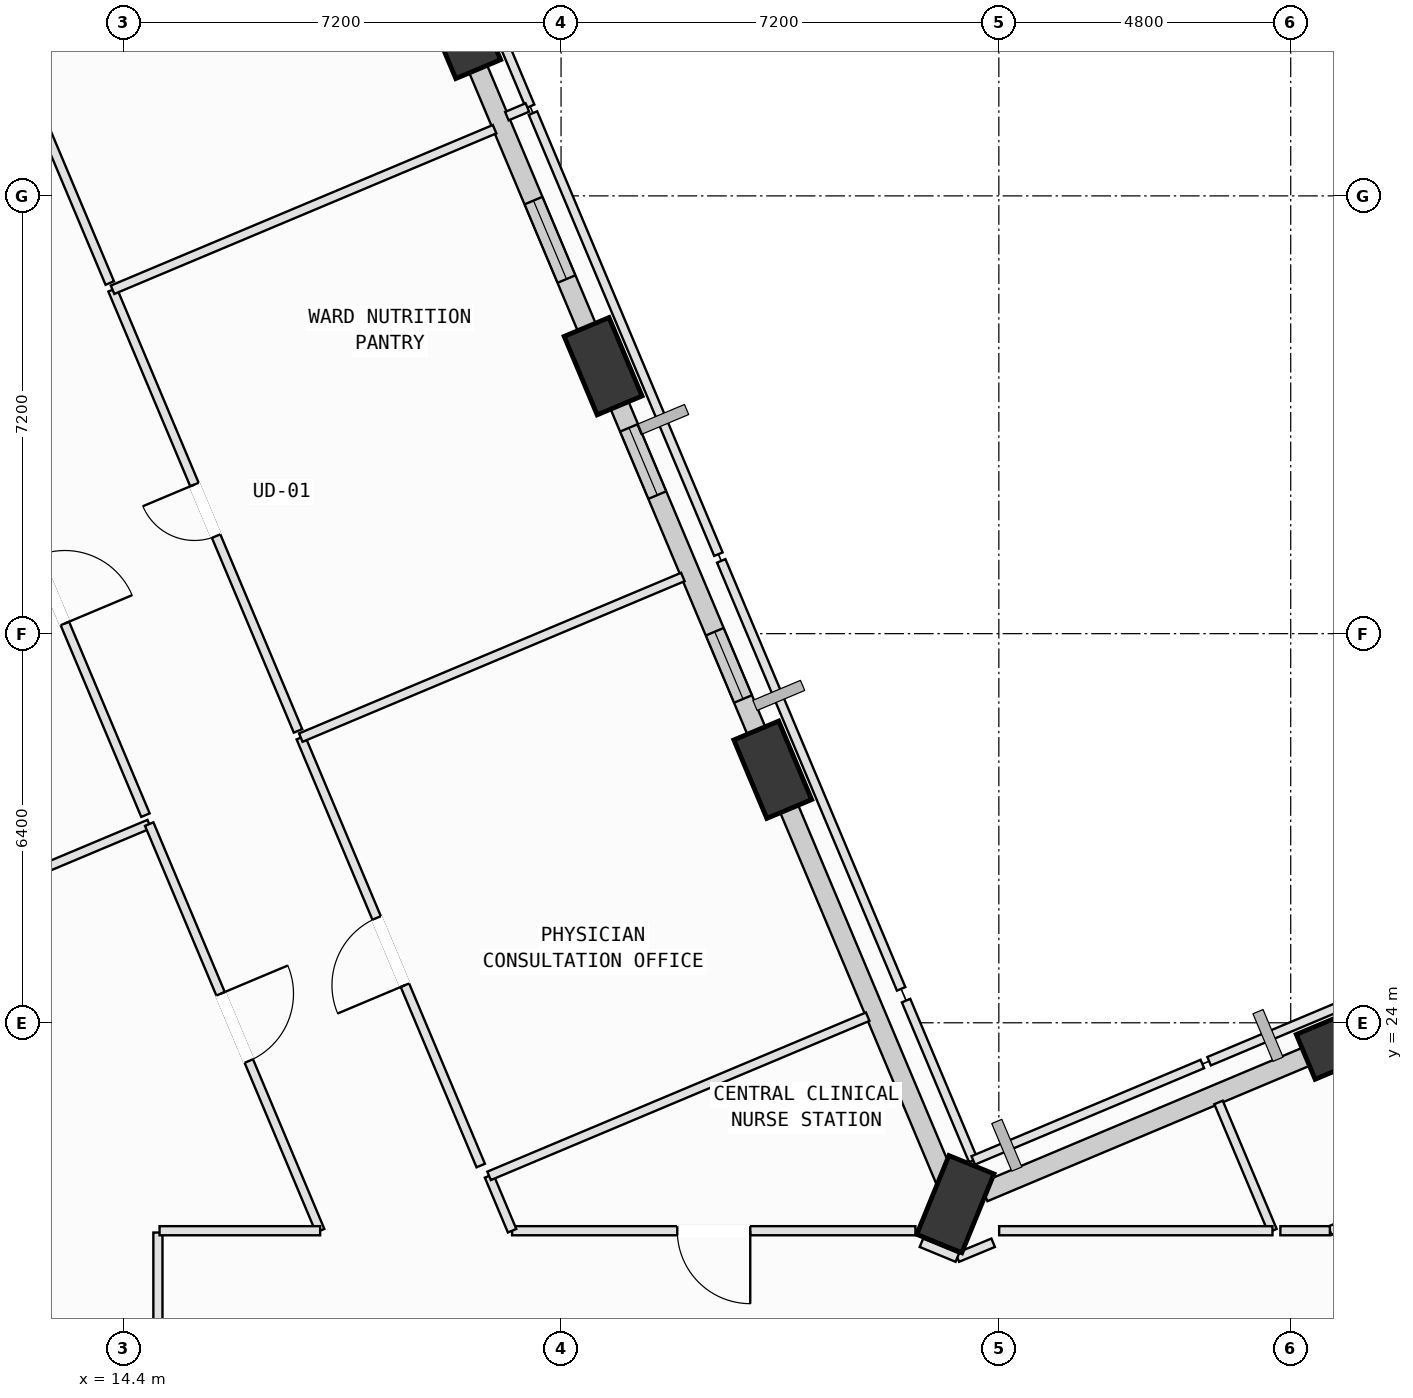
"""IFC4 building model, lengths in metres.
Left out: names, types, materials, properties, quantities, classifications, styles, units other than length and angle.
Written with IfcOpenShell. Run it as: python <this file> out.ifc"""

import sys

from ifc_helpers import new_model, si_unit, direction, frame, frame_2d, origin, origin_2d, place, context, subcontext, project, spatial, rectangle, extrude, element, fill, save


model = new_model("IFC4")
c1 = context("Model", 3, precision=1e-05, world=origin(), true_north=direction((0.0, 1.0)))
c2 = subcontext(c1, "Body", "Model", "MODEL_VIEW")
j1 = project(units=[si_unit("LENGTHUNIT", "METRE"), si_unit("PLANEANGLEUNIT", "RADIAN")], contexts=[c1])
p1 = place(None, origin())
s1 = spatial("IfcSite", under=j1, at=p1, CompositionType="ELEMENT")
p2 = place(p1, origin())
s2 = spatial("IfcBuilding", under=s1, at=p2, CompositionType="ELEMENT")
p3 = place(p2, frame((0.0, 0.0, 120.4)))
s3 = spatial("IfcBuildingStorey", under=s2, at=p3, CompositionType="ELEMENT", Elevation=120.4)
p4 = place(p3, frame((34.492, 23.71, 0.002), z_axis=(0.004459574025, 0.003726493364, 0.999983112581), x_axis=(-0.888473565958, 0.458922270897, 0.002252080872)))
e1 = element("IfcColumn", 1, at=p4, inside=s3, PredefinedType="COLUMN", context=c2, shape_type="SweptSolid", body=[
    extrude(rectangle(XDim=1.4, YDim=0.8, at=origin_2d()), origin(), (0.0, 0.0, 1.0), 3.996),
])
p5 = place(p3, frame((28.085, 21.017, 0.002), z_axis=(0.015877558685, -0.022778189959, 0.999614454273), x_axis=(-0.219275335799, 0.975324277827, 0.025707590136)))
e2 = element("IfcColumn", 2, at=p5, inside=s3, PredefinedType="COLUMN", context=c2, shape_type="SweptSolid", body=[
    extrude(rectangle(XDim=1.4, YDim=0.8, at=origin_2d()), origin(), (0.0, 0.0, 1.0), 3.998),
])
p6 = place(p3, frame((25.082, 28.162, 0.002), z_axis=(-0.013674542539, -0.035407297646, 0.999279405452), x_axis=(-0.029610655568, 0.998948888693, 0.034990382344)))
e3 = element("IfcColumn", 3, at=p6, inside=s3, PredefinedType="COLUMN", context=c2, shape_type="SweptSolid", body=[
    extrude(rectangle(XDim=1.4, YDim=0.8, at=origin_2d()), origin(), (0.0, 0.0, 1.0), 3.999),
])
p7 = place(p3, frame((22.292, 34.799, 0.002), z_axis=(-0.040973075372, -0.047131231045, 0.998048021968), x_axis=(0.311183272161, 0.948604503294, 0.057571411811)))
e4 = element("IfcColumn", 4, at=p7, inside=s3, PredefinedType="COLUMN", context=c2, shape_type="SweptSolid", body=[
    extrude(rectangle(XDim=1.4, YDim=0.8, at=origin_2d()), origin(), (0.0, 0.0, 1.0), 4.004),
])
p8 = place(p3, frame((19.966, 40.33, 0.002), z_axis=(-0.063668290579, -0.056790167409, 0.996353966048), x_axis=(0.427498847838, 0.900588142351, 0.078649430732)))
e5 = element("IfcColumn", 5, at=p8, inside=s3, PredefinedType="COLUMN", context=c2, shape_type="SweptSolid", body=[
    extrude(rectangle(XDim=1.4, YDim=0.8, at=origin_2d()), origin(), (0.0, 0.0, 1.0), 4.011),
])
p9 = place(p3, frame((28.55, 21.213, 0.0), z_axis=(0.0, 0.0, 1.0), x_axis=(0.921866530415, 0.387507548444, 0.0)))
e6 = element("IfcWall", 6, at=p9, inside=s3, PredefinedType="SOLIDWALL", context=c2, shape_type="SweptSolid", body=[
    extrude(rectangle(XDim=5.96, YDim=0.32, at=frame_2d((2.98, 0.0))), origin(), (0.0, 0.0, 1.0), 3.165),
])
p10 = place(p3, frame((25.294, 27.656, 0.0), z_axis=(0.0, 0.0, 1.0), x_axis=(0.387511216986, -0.921864988331, 0.0)))
e7 = element("IfcWall", 7, at=p10, inside=s3, PredefinedType="SOLIDWALL", context=c2, shape_type="SweptSolid", body=[
    extrude(rectangle(XDim=6.76, YDim=0.32, at=frame_2d((3.38, 0.0))), origin(), (0.0, 0.0, 1.0), 3.165),
])
p11 = place(p3, frame((22.5, 34.302, 0.0), z_axis=(0.0, 0.0, 1.0), x_axis=(0.387521956869, -0.921860473686, 0.0)))
e8 = element("IfcWall", 8, at=p11, inside=s3, PredefinedType="SOLIDWALL", context=c2, shape_type="SweptSolid", body=[
    extrude(rectangle(XDim=6.223, YDim=0.32, at=frame_2d((3.111, 0.0))), origin(), (0.0, 0.0, 1.0), 3.165),
])
p12 = place(p11, frame((4.199, 0.0, 0.75)))
e9 = element("IfcOpeningElement", 9, at=p12, cuts=e8, PredefinedType="OPENING", context=c2, shape_type="SweptSolid", body=[
    extrude(rectangle(XDim=1.2, YDim=1.75, at=frame_2d((0.6, 0.875))), frame((0.0, 0.17, 0.0), z_axis=(0.0, -1.0, 0.0), x_axis=(1.0, 0.0, 0.0)), (0.0, 0.0, 1.0), 0.34),
])
p13 = place(p11, frame((0.561, 0.0, 0.75)))
e10 = element("IfcOpeningElement", 10, at=p13, cuts=e8, PredefinedType="OPENING", context=c2, shape_type="SweptSolid", body=[
    extrude(rectangle(XDim=1.2, YDim=1.75, at=frame_2d((0.6, 0.875))), frame((0.0, 0.17, 0.0), z_axis=(0.0, -1.0, 0.0), x_axis=(1.0, 0.0, 0.0)), (0.0, 0.0, 1.0), 0.34),
])
p14 = place(p3, frame((20.17, 39.847, 0.0), z_axis=(0.0, 0.0, 1.0), x_axis=(0.387505493495, -0.921867394212, 0.0)))
e11 = element("IfcWall", 11, at=p14, inside=s3, PredefinedType="SOLIDWALL", context=c2, shape_type="SweptSolid", body=[
    extrude(rectangle(XDim=5.047, YDim=0.32, at=frame_2d((2.523, 0.0))), origin(), (0.0, 0.0, 1.0), 3.165),
])
p15 = place(p14, frame((2.521, 0.0, 0.75)))
e12 = element("IfcOpeningElement", 12, at=p15, cuts=e11, PredefinedType="OPENING", context=c2, shape_type="SweptSolid", body=[
    extrude(rectangle(XDim=1.4, YDim=1.85, at=frame_2d((0.7, 0.925))), frame((0.0, 0.17, 0.0), z_axis=(0.0, -1.0, 0.0), x_axis=(1.0, 0.0, 0.0)), (0.0, 0.0, 1.0), 0.34),
])
p16 = place(p3, frame((14.97, 20.55, 0.0), z_axis=(0.0, 0.0, 1.0), x_axis=(0.0, -1.0, 0.0)))
e13 = element("IfcWall", 13, at=p16, inside=s3, PredefinedType="PARTITIONING", context=c2, shape_type="SweptSolid", body=[
    extrude(rectangle(XDim=1.943, YDim=0.15, at=frame_2d((0.972, 0.0))), origin(), (0.0, 0.0, 1.0), 3.78),
])
p17 = place(p3, frame((4.719, 23.019, 0.0), z_axis=(0.0, 0.0, 1.0), x_axis=(0.921861546859, 0.387519403931, 0.0)))
e14 = element("IfcWall", 14, at=p17, inside=s3, PredefinedType="PARTITIONING", context=c2, shape_type="SweptSolid", body=[
    extrude(rectangle(XDim=10.965, YDim=0.15, at=frame_2d((5.482, 0.0))), origin(), (0.0, 0.0, 1.0), 3.78),
])
p18 = place(p3, frame((14.827, 27.268, 0.0), z_axis=(0.0, 0.0, 1.0), x_axis=(0.387476197679, -0.921879708114, 0.0)))
e15 = element("IfcWall", 15, at=p18, inside=s3, PredefinedType="PARTITIONING", context=c2, shape_type="SweptSolid", body=[
    extrude(rectangle(XDim=7.255, YDim=0.15, at=frame_2d((3.627, 0.0))), origin(), (0.0, 0.0, 1.0), 3.78),
])
p19 = place(p18, frame((3.027, 0.0, 0.0)))
e16 = element("IfcOpeningElement", 16, at=p19, cuts=e15, PredefinedType="OPENING", context=c2, shape_type="SweptSolid", body=[
    extrude(rectangle(XDim=1.2, YDim=2.15, at=frame_2d((0.6, 1.075))), frame((0.0, 0.085, 0.0), z_axis=(0.0, -1.0, 0.0), x_axis=(1.0, 0.0, 0.0)), (0.0, 0.0, 1.0), 0.17),
])
p20 = place(p3, frame((17.638, 20.58, 0.0), z_axis=(0.0, 0.0, 1.0), x_axis=(-1.0, 0.0, 0.0)))
e17 = element("IfcWall", 17, at=p20, inside=s3, PredefinedType="PARTITIONING", context=c2, shape_type="SweptSolid", body=[
    extrude(rectangle(XDim=2.641, YDim=0.15, at=frame_2d((1.32, 0.0))), origin(), (0.0, 0.0, 1.0), 3.78),
])
p21 = place(p3, frame((11.649, 34.827, 0.0), z_axis=(0.0, 0.0, 1.0), x_axis=(0.387547881375, -0.921849575387, 0.0)))
e18 = element("IfcWall", 18, at=p21, inside=s3, PredefinedType="PARTITIONING", context=c2, shape_type="SweptSolid", body=[
    extrude(rectangle(XDim=8.04, YDim=0.15, at=frame_2d((4.02, 0.0))), origin(), (0.0, 0.0, 1.0), 3.78),
])
p22 = place(p21, frame((3.42, 0.0, 0.0)))
e19 = element("IfcOpeningElement", 19, at=p22, cuts=e18, PredefinedType="OPENING", context=c2, shape_type="SweptSolid", body=[
    extrude(rectangle(XDim=1.2, YDim=2.15, at=frame_2d((0.6, 1.075))), frame((0.0, 0.085, 0.0), z_axis=(0.0, -1.0, 0.0), x_axis=(1.0, 0.0, 0.0)), (0.0, 0.0, 1.0), 0.17),
])
p23 = place(p3, frame((28.706, 20.382, 0.0), z_axis=(0.0, 0.0, 1.0), x_axis=(-0.923811477415, -0.382847690599, 0.0)))
e20 = element("IfcWall", 20, at=p23, inside=s3, PredefinedType="PARTITIONING", context=c2, shape_type="SweptSolid", body=[
    extrude(rectangle(XDim=0.638, YDim=0.15, at=frame_2d((0.319, 0.0))), origin(), (0.0, 0.0, 1.0), 3.78),
])
p24 = place(p3, frame((28.117, 20.138, 0.0), z_axis=(0.0, 0.0, 1.0), x_axis=(-0.923979554509, 0.382441868588, 0.0)))
e21 = element("IfcWall", 21, at=p24, inside=s3, PredefinedType="PARTITIONING", context=c2, shape_type="SweptSolid", body=[
    extrude(rectangle(XDim=0.638, YDim=0.15, at=frame_2d((0.319, 0.0))), origin(), (0.0, 0.0, 1.0), 3.78),
])
p25 = place(p3, frame((27.428, 20.58, 0.0), z_axis=(0.0, 0.0, 1.0), x_axis=(-1.0, 0.0, 0.0)))
e22 = element("IfcWall", 22, at=p25, inside=s3, PredefinedType="PARTITIONING", context=c2, shape_type="SweptSolid", body=[
    extrude(rectangle(XDim=6.633, YDim=0.15, at=frame_2d((3.316, 0.0))), origin(), (0.0, 0.0, 1.0), 3.78),
])
p26 = place(p25, frame((2.717, 0.0, 0.0)))
e23 = element("IfcOpeningElement", 23, at=p26, cuts=e22, PredefinedType="OPENING", context=c2, shape_type="SweptSolid", body=[
    extrude(rectangle(XDim=1.2, YDim=2.15, at=frame_2d((0.6, 1.075))), frame((0.0, 0.085, 0.0), z_axis=(0.0, -1.0, 0.0), x_axis=(1.0, 0.0, 0.0)), (0.0, 0.0, 1.0), 0.17),
])
p27 = place(p3, frame((20.795, 20.58, 0.0), z_axis=(0.0, 0.0, 1.0), x_axis=(-0.387342801036, 0.921935764837, 0.0)))
e24 = element("IfcWall", 24, at=p27, inside=s3, PredefinedType="PARTITIONING", context=c2, shape_type="SweptSolid", body=[
    extrude(rectangle(XDim=0.978, YDim=0.15, at=frame_2d((0.489, 0.0))), origin(), (0.0, 0.0, 1.0), 3.78),
])
p28 = place(p3, frame((20.416, 21.482, 0.0), z_axis=(0.0, 0.0, 1.0), x_axis=(0.921833906967, 0.38758514931, 0.0)))
e25 = element("IfcWall", 25, at=p28, inside=s3, PredefinedType="PARTITIONING", context=c2, shape_type="SweptSolid", body=[
    extrude(rectangle(XDim=6.755, YDim=0.15, at=frame_2d((3.377, 0.0))), origin(), (0.0, 0.0, 1.0), 3.78),
])
p29 = place(p3, frame((27.274, 24.365, 0.0), z_axis=(0.0, 0.0, 1.0), x_axis=(0.387605178951, -0.921825485247, 0.0)))
e26 = element("IfcWall", 26, at=p29, inside=s3, PredefinedType="PARTITIONING", context=c2, shape_type="SweptSolid", body=[
    extrude(rectangle(XDim=2.851, YDim=0.15, at=frame_2d((1.425, 0.0))), origin(), (0.0, 0.0, 1.0), 3.78),
])
p30 = place(p3, frame((28.379, 21.737, 0.0), z_axis=(0.0, 0.0, 1.0), x_axis=(0.921774717682, 0.387725895244, 0.0)))
e27 = element("IfcWall", 27, at=p30, inside=s3, PredefinedType="PARTITIONING", context=c2, shape_type="SweptSolid", body=[
    extrude(rectangle(XDim=4.088, YDim=0.15, at=frame_2d((2.044, 0.0))), origin(), (0.0, 0.0, 1.0), 3.78),
])
p31 = place(p3, frame((32.413, 22.69, 0.0), z_axis=(0.0, 0.0, 1.0), x_axis=(0.387537134963, -0.921854093132, 0.0)))
e28 = element("IfcWall", 28, at=p31, inside=s3, PredefinedType="PARTITIONING", context=c2, shape_type="SweptSolid", body=[
    extrude(rectangle(XDim=2.289, YDim=0.15, at=frame_2d((1.145, 0.0))), origin(), (0.0, 0.0, 1.0), 3.78),
])
p32 = place(p3, frame((33.3, 20.58, 0.0), z_axis=(0.0, 0.0, 1.0), x_axis=(-1.0, 0.0, 0.0)))
e29 = element("IfcWall", 29, at=p32, inside=s3, PredefinedType="PARTITIONING", context=c2, shape_type="SweptSolid", body=[
    extrude(rectangle(XDim=4.495, YDim=0.15, at=frame_2d((2.248, 0.0))), origin(), (0.0, 0.0, 1.0), 3.78),
])
p33 = place(p3, frame((32.258, 23.368, 0.0), z_axis=(0.0, 0.0, 1.0), x_axis=(0.921840796655, 0.387568762443, 0.0)))
e30 = element("IfcWall", 30, at=p33, inside=s3, PredefinedType="PARTITIONING", context=c2, shape_type="SweptSolid", body=[
    extrude(rectangle(XDim=6.998, YDim=0.15, at=frame_2d((3.499, 0.0))), origin(), (0.0, 0.0, 1.0), 3.78),
])
p34 = place(p3, frame((44.851, 25.038, 0.0), z_axis=(0.0, 0.0, 1.0), x_axis=(-0.921889203051, -0.38745360664, 0.0)))
e31 = element("IfcWall", 31, at=p34, inside=s3, PredefinedType="PARTITIONING", context=c2, shape_type="SweptSolid", body=[
    extrude(rectangle(XDim=11.506, YDim=0.15, at=frame_2d((5.753, 0.0))), origin(), (0.0, 0.0, 1.0), 2.945),
])
p35 = place(p34, frame((5.153, 0.0, 0.0)))
e32 = element("IfcOpeningElement", 32, at=p35, cuts=e31, PredefinedType="OPENING", context=c2, shape_type="SweptSolid", body=[
    extrude(rectangle(XDim=1.2, YDim=2.15, at=frame_2d((0.6, 1.075))), frame((0.0, 0.085, 0.0), z_axis=(0.0, -1.0, 0.0), x_axis=(1.0, 0.0, 0.0)), (0.0, 0.0, 1.0), 0.17),
])
p36 = place(p3, frame((34.244, 20.58, 0.0), z_axis=(0.0, 0.0, 1.0), x_axis=(-1.0, 0.0, 0.0)))
e33 = element("IfcWall", 33, at=p36, inside=s3, PredefinedType="PARTITIONING", context=c2, shape_type="SweptSolid", body=[
    extrude(rectangle(XDim=0.814, YDim=0.15, at=frame_2d((0.407, 0.0))), origin(), (0.0, 0.0, 1.0), 3.78),
])
p37 = place(p3, frame((20.279, 21.652, 0.0), z_axis=(0.0, 0.0, 1.0), x_axis=(-0.38757659616, 0.921837503093, 0.0)))
e34 = element("IfcWall", 34, at=p37, inside=s3, PredefinedType="PARTITIONING", context=c2, shape_type="SweptSolid", body=[
    extrude(rectangle(XDim=7.635, YDim=0.15, at=frame_2d((3.817, 0.0))), origin(), (0.0, 0.0, 1.0), 3.78),
])
p38 = place(p37, frame((3.217, 0.0, 0.0)))
e35 = element("IfcOpeningElement", 35, at=p38, cuts=e34, PredefinedType="OPENING", context=c2, shape_type="SweptSolid", body=[
    extrude(rectangle(XDim=1.2, YDim=2.15, at=frame_2d((0.6, 1.075))), frame((0.0, 0.085, 0.0), z_axis=(0.0, -1.0, 0.0), x_axis=(1.0, 0.0, 0.0)), (0.0, 0.0, 1.0), 0.17),
])
p39 = place(p3, frame((17.32, 28.69, 0.0), z_axis=(0.0, 0.0, 1.0), x_axis=(0.921811932434, 0.387637409473, 0.0)))
e36 = element("IfcWall", 36, at=p39, inside=s3, PredefinedType="PARTITIONING", context=c2, shape_type="SweptSolid", body=[
    extrude(rectangle(XDim=6.816, YDim=0.15, at=frame_2d((3.408, 0.0))), origin(), (0.0, 0.0, 1.0), 3.78),
])
p40 = place(p3, frame((24.234, 31.597, 0.0), z_axis=(0.0, 0.0, 1.0), x_axis=(0.387558072008, -0.921845291153, 0.0)))
e37 = element("IfcWall", 37, at=p40, inside=s3, PredefinedType="PARTITIONING", context=c2, shape_type="SweptSolid", body=[
    extrude(rectangle(XDim=7.635, YDim=0.15, at=frame_2d((3.818, 0.0))), origin(), (0.0, 0.0, 1.0), 3.78),
])
p41 = place(p3, frame((17.274, 28.801, 0.0), z_axis=(0.0, 0.0, 1.0), x_axis=(-0.387529923364, 0.921857124775, 0.0)))
e38 = element("IfcWall", 38, at=p41, inside=s3, PredefinedType="PARTITIONING", context=c2, shape_type="SweptSolid", body=[
    extrude(rectangle(XDim=7.87, YDim=0.15, at=frame_2d((3.935, 0.0))), origin(), (0.0, 0.0, 1.0), 3.78),
])
p42 = place(p41, frame((3.475, 0.0, 0.0)))
e39 = element("IfcOpeningElement", 39, at=p42, cuts=e38, PredefinedType="OPENING", context=c2, shape_type="SweptSolid", body=[
    extrude(rectangle(XDim=0.92, YDim=2.1, at=frame_2d((0.46, 1.05))), frame((0.0, 0.085, 0.0), z_axis=(0.0, -1.0, 0.0), x_axis=(1.0, 0.0, 0.0)), (0.0, 0.0, 1.0), 0.17),
])
p43 = place(p3, frame((14.224, 36.056, 0.0), z_axis=(0.0, 0.0, 1.0), x_axis=(0.921863124429, 0.387515651062, 0.0)))
e40 = element("IfcWall", 40, at=p43, inside=s3, PredefinedType="PARTITIONING", context=c2, shape_type="SweptSolid", body=[
    extrude(rectangle(XDim=6.815, YDim=0.15, at=frame_2d((3.408, 0.0))), origin(), (0.0, 0.0, 1.0), 3.78),
])
p44 = place(p3, frame((21.138, 38.962, 0.0), z_axis=(0.0, 0.0, 1.0), x_axis=(0.387556286233, -0.921846041919, 0.0)))
e41 = element("IfcWall", 41, at=p44, inside=s3, PredefinedType="PARTITIONING", context=c2, shape_type="SweptSolid", body=[
    extrude(rectangle(XDim=7.87, YDim=0.15, at=frame_2d((3.935, 0.0))), origin(), (0.0, 0.0, 1.0), 3.78),
])
p45 = place(p3, frame((18.575, 45.061, 0.0), z_axis=(0.0, 0.0, 1.0), x_axis=(0.387509152275, -0.921865856241, 0.0)))
e42 = element("IfcWall", 42, at=p45, inside=s3, PredefinedType="PARTITIONING", context=c2, shape_type="SweptSolid", body=[
    extrude(rectangle(XDim=6.496, YDim=0.15, at=frame_2d((3.248, 0.0))), origin(), (0.0, 0.0, 1.0), 3.78),
])
p46 = place(p3, frame((21.046, 39.054, 0.0), z_axis=(0.0, 0.0, 1.0), x_axis=(-0.921647946152, -0.388027142547, 0.0)))
e43 = element("IfcWall", 43, at=p46, inside=s3, PredefinedType="PARTITIONING", context=c2, shape_type="SweptSolid", body=[
    extrude(rectangle(XDim=0.365, YDim=0.15, at=frame_2d((0.183, 0.0))), origin(), (0.0, 0.0, 1.0), 3.78),
])
p47 = place(p3, frame((14.178, 36.167, 0.0), z_axis=(0.0, 0.0, 1.0), x_axis=(-0.387585091444, 0.921833931297, 0.0)))
e44 = element("IfcWall", 44, at=p47, inside=s3, PredefinedType="PARTITIONING", context=c2, shape_type="SweptSolid", body=[
    extrude(rectangle(XDim=7.309, YDim=0.15, at=frame_2d((3.655, 0.0))), origin(), (0.0, 0.0, 1.0), 3.78),
])
p48 = place(p47, frame((3.195, 0.0, 0.0)))
e45 = element("IfcOpeningElement", 45, at=p48, cuts=e44, PredefinedType="OPENING", context=c2, shape_type="SweptSolid", body=[
    extrude(rectangle(XDim=0.92, YDim=2.1, at=frame_2d((0.46, 1.05))), frame((0.0, 0.085, 0.0), z_axis=(0.0, -1.0, 0.0), x_axis=(1.0, 0.0, 0.0)), (0.0, 0.0, 1.0), 0.17),
])
p49 = place(p12, origin())
e46 = element("IfcWindow", 46, at=p49, inside=s3, PartitioningType="SINGLE_PANEL", PredefinedType="WINDOW", context=c2, shape_type="SweptSolid", body=[
    extrude(rectangle(XDim=1.2, YDim=1.75, at=frame_2d((0.6, 0.875))), frame((0.0, 0.03, 0.0), z_axis=(0.0, -1.0, 0.0), x_axis=(1.0, 0.0, 0.0)), (0.0, 0.0, 1.0), 0.06),
])
fill(e9, e46)
p50 = place(p13, origin())
e47 = element("IfcWindow", 47, at=p50, inside=s3, PartitioningType="SINGLE_PANEL", PredefinedType="WINDOW", context=c2, shape_type="SweptSolid", body=[
    extrude(rectangle(XDim=1.2, YDim=1.75, at=frame_2d((0.6, 0.875))), frame((0.0, 0.03, 0.0), z_axis=(0.0, -1.0, 0.0), x_axis=(1.0, 0.0, 0.0)), (0.0, 0.0, 1.0), 0.06),
])
fill(e10, e47)
p51 = place(p15, origin())
e48 = element("IfcWindow", 48, at=p51, inside=s3, PartitioningType="SINGLE_PANEL", PredefinedType="WINDOW", context=c2, shape_type="SweptSolid", body=[
    extrude(rectangle(XDim=1.4, YDim=1.85, at=frame_2d((0.7, 0.925))), frame((0.0, 0.03, 0.0), z_axis=(0.0, -1.0, 0.0), x_axis=(1.0, 0.0, 0.0)), (0.0, 0.0, 1.0), 0.06),
])
fill(e12, e48)
p52 = place(p19, origin())
e49 = element("IfcDoor", 49, at=p52, inside=s3, OperationType="SINGLE_SWING_LEFT", PredefinedType="DOOR", context=c2, shape_type="SweptSolid", body=[
    extrude(rectangle(XDim=1.2, YDim=2.15, at=frame_2d((0.6, 1.075))), frame((0.0, 0.025, 0.0), z_axis=(0.0, -1.0, 0.0), x_axis=(1.0, 0.0, 0.0)), (0.0, 0.0, 1.0), 0.05),
])
fill(e16, e49)
p53 = place(p22, origin())
e50 = element("IfcDoor", 50, at=p53, inside=s3, OperationType="SINGLE_SWING_RIGHT", PredefinedType="DOOR", context=c2, shape_type="SweptSolid", body=[
    extrude(rectangle(XDim=1.2, YDim=2.15, at=frame_2d((0.6, 1.075))), frame((0.0, 0.025, 0.0), z_axis=(0.0, -1.0, 0.0), x_axis=(1.0, 0.0, 0.0)), (0.0, 0.0, 1.0), 0.05),
])
fill(e19, e50)
p54 = place(p26, origin())
e51 = element("IfcDoor", 51, at=p54, inside=s3, OperationType="SINGLE_SWING_LEFT", PredefinedType="DOOR", context=c2, shape_type="SweptSolid", body=[
    extrude(rectangle(XDim=1.2, YDim=2.15, at=frame_2d((0.6, 1.075))), frame((0.0, 0.025, 0.0), z_axis=(0.0, -1.0, 0.0), x_axis=(1.0, 0.0, 0.0)), (0.0, 0.0, 1.0), 0.05),
])
fill(e23, e51)
p55 = place(p38, origin())
e52 = element("IfcDoor", 52, at=p55, inside=s3, OperationType="SINGLE_SWING_LEFT", PredefinedType="DOOR", context=c2, shape_type="SweptSolid", body=[
    extrude(rectangle(XDim=1.2, YDim=2.15, at=frame_2d((0.6, 1.075))), frame((0.0, 0.025, 0.0), z_axis=(0.0, -1.0, 0.0), x_axis=(1.0, 0.0, 0.0)), (0.0, 0.0, 1.0), 0.05),
])
fill(e35, e52)
p56 = place(p42, origin())
e53 = element("IfcDoor", 53, at=p56, inside=s3, OperationType="SINGLE_SWING_RIGHT", PredefinedType="DOOR", context=c2, shape_type="SweptSolid", body=[
    extrude(rectangle(XDim=0.92, YDim=2.1, at=frame_2d((0.46, 1.05))), frame((0.0, 0.025, 0.0), z_axis=(0.0, -1.0, 0.0), x_axis=(1.0, 0.0, 0.0)), (0.0, 0.0, 1.0), 0.05),
])
fill(e39, e53)
save(model, sys.argv[1])
